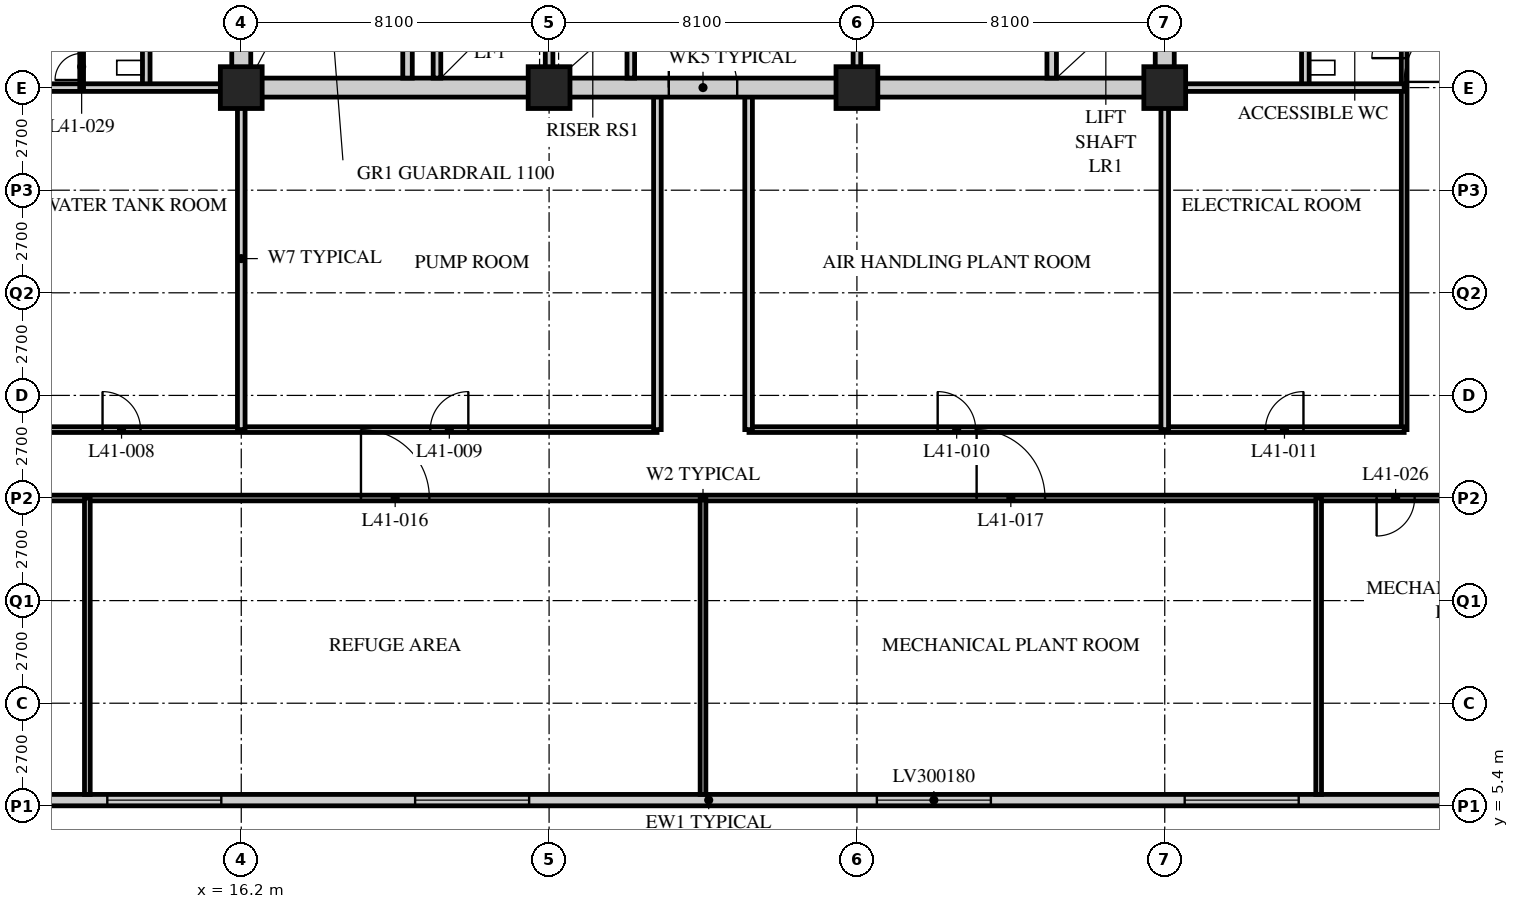
"""IFC4 building model, lengths in metres.
Left out: names, types, materials, properties, quantities, classifications, styles, units other than length and angle.
Written with IfcOpenShell. Run it as: python <this file> out.ifc"""

import sys

from ifc_helpers import new_model, si_unit, direction, frame, frame_2d, origin, origin_2d, place, context, subcontext, project, spatial, rectangle, hollow_rectangle, extrude, element, fill, save


model = new_model("IFC4")
c1 = context("Model", 3, precision=1e-05, world=origin(), true_north=direction((0.0, 1.0)))
c2 = subcontext(c1, "Body", "Model", "MODEL_VIEW")
j1 = project(units=[si_unit("LENGTHUNIT", "METRE"), si_unit("PLANEANGLEUNIT", "RADIAN")], contexts=[c1])
p1 = place(None, origin())
s1 = spatial("IfcSite", under=j1, at=p1, CompositionType="ELEMENT")
p2 = place(p1, origin())
s2 = spatial("IfcBuilding", under=s1, at=p2, CompositionType="ELEMENT")
p3 = place(p2, frame((0.0, 0.0, 157.8)))
s3 = spatial("IfcBuildingStorey", under=s2, at=p3, CompositionType="ELEMENT", Elevation=157.8)
for number, where, z_axis, x_axis in (
    (1, (16.2, 24.3, 0.0), (0.0, 0.0, 1.0), (1.0, 0.0, 0.0)),
    (2, (24.3, 24.3, 0.0), (0.0, 0.0, 1.0), (1.0, 0.0, 0.0)),
    (3, (32.4, 24.3, 0.0), (0.0, 0.0, 1.0), (1.0, 0.0, 0.0)),
    (4, (40.5, 24.3, 0.0), (0.0, 0.0, 1.0), (1.0, 0.0, 0.0)),
):
    element("IfcColumn", number, at=place(p3, frame(where, z_axis=z_axis, x_axis=x_axis)), inside=s3, PredefinedType="COLUMN", context=c2, shape_type="SweptSolid", body=[
        extrude(hollow_rectangle(XDim=1.1, YDim=1.1, WallThickness=0.1, at=origin_2d()), origin(), (0.0, 0.0, 1.0), 7.2),
    ])
p4 = place(p3, frame((8.4, 5.55, 0.0), z_axis=(0.0, 0.0, 1.0), x_axis=(1.0, 0.0, 0.0)))
e5 = element("IfcWall", 5, at=p4, inside=s3, PredefinedType="SOLIDWALL", context=c2, shape_type="SweptSolid", body=[
    extrude(rectangle(XDim=40.2, YDim=0.3, at=frame_2d((20.1, 0.0))), origin(), (0.0, 0.0, 1.0), 5.95),
])
p5 = place(p4, frame((4.275, 0.0, 1.0)))
e6 = element("IfcOpeningElement", 6, at=p5, cuts=e5, PredefinedType="OPENING", context=c2, shape_type="SweptSolid", body=[
    extrude(rectangle(XDim=3.0, YDim=1.8, at=frame_2d((1.5, 0.9))), frame((0.0, 0.16, 0.0), z_axis=(0.0, -1.0, 0.0), x_axis=(1.0, 0.0, 0.0)), (0.0, 0.0, 1.0), 0.32),
])
p6 = place(p4, frame((12.375, 0.0, 1.0)))
e7 = element("IfcOpeningElement", 7, at=p6, cuts=e5, PredefinedType="OPENING", context=c2, shape_type="SweptSolid", body=[
    extrude(rectangle(XDim=3.0, YDim=1.8, at=frame_2d((1.5, 0.9))), frame((0.0, 0.16, 0.0), z_axis=(0.0, -1.0, 0.0), x_axis=(1.0, 0.0, 0.0)), (0.0, 0.0, 1.0), 0.32),
])
p7 = place(p4, frame((24.525, 0.0, 1.0)))
e8 = element("IfcOpeningElement", 8, at=p7, cuts=e5, PredefinedType="OPENING", context=c2, shape_type="SweptSolid", body=[
    extrude(rectangle(XDim=3.0, YDim=1.8, at=frame_2d((1.5, 0.9))), frame((0.0, 0.16, 0.0), z_axis=(0.0, -1.0, 0.0), x_axis=(1.0, 0.0, 0.0)), (0.0, 0.0, 1.0), 0.32),
])
p8 = place(p4, frame((32.625, 0.0, 1.0)))
e9 = element("IfcOpeningElement", 9, at=p8, cuts=e5, PredefinedType="OPENING", context=c2, shape_type="SweptSolid", body=[
    extrude(rectangle(XDim=3.0, YDim=1.8, at=frame_2d((1.5, 0.9))), frame((0.0, 0.16, 0.0), z_axis=(0.0, -1.0, 0.0), x_axis=(1.0, 0.0, 0.0)), (0.0, 0.0, 1.0), 0.32),
])
p9 = place(p3, frame((8.1, 13.5, 0.0), z_axis=(0.0, 0.0, 1.0), x_axis=(1.0, 0.0, 0.0)))
e10 = element("IfcWall", 10, at=p9, inside=s3, PredefinedType="PARTITIONING", context=c2, shape_type="SweptSolid", body=[
    extrude(rectangle(XDim=40.5, YDim=0.15, at=frame_2d((20.25, 0.0))), origin(), (0.0, 0.0, 1.0), 6.95),
])
p10 = place(p9, frame((11.25, 0.0, 0.0)))
e11 = element("IfcOpeningElement", 11, at=p10, cuts=e10, PredefinedType="OPENING", context=c2, shape_type="SweptSolid", body=[
    extrude(rectangle(XDim=1.8, YDim=2.4, at=frame_2d((0.9, 1.2))), frame((0.0, 0.085, 0.0), z_axis=(0.0, -1.0, 0.0), x_axis=(1.0, 0.0, 0.0)), (0.0, 0.0, 1.0), 0.17),
])
p11 = place(p9, frame((27.45, 0.0, 0.0)))
e12 = element("IfcOpeningElement", 12, at=p11, cuts=e10, PredefinedType="OPENING", context=c2, shape_type="SweptSolid", body=[
    extrude(rectangle(XDim=1.8, YDim=2.4, at=frame_2d((0.9, 1.2))), frame((0.0, 0.085, 0.0), z_axis=(0.0, -1.0, 0.0), x_axis=(1.0, 0.0, 0.0)), (0.0, 0.0, 1.0), 0.17),
])
p12 = place(p9, frame((1.525, 0.0, 0.0)))
e13 = element("IfcOpeningElement", 13, at=p12, cuts=e10, PredefinedType="OPENING", context=c2, shape_type="SweptSolid", body=[
    extrude(rectangle(XDim=1.0, YDim=2.1, at=frame_2d((0.5, 1.05))), frame((0.0, 0.085, 0.0), z_axis=(0.0, -1.0, 0.0), x_axis=(1.0, 0.0, 0.0)), (0.0, 0.0, 1.0), 0.17),
])
p13 = place(p9, frame((37.975, 0.0, 0.0)))
e14 = element("IfcOpeningElement", 14, at=p13, cuts=e10, PredefinedType="OPENING", context=c2, shape_type="SweptSolid", body=[
    extrude(rectangle(XDim=1.0, YDim=2.1, at=frame_2d((0.5, 1.05))), frame((0.0, 0.085, 0.0), z_axis=(0.0, -1.0, 0.0), x_axis=(1.0, 0.0, 0.0)), (0.0, 0.0, 1.0), 0.17),
])
p14 = place(p3, frame((46.8, 15.3, 0.0), z_axis=(0.0, 0.0, 1.0), x_axis=(0.0, 1.0, 0.0)))
e15 = element("IfcWall", 15, at=p14, inside=s3, PredefinedType="PARTITIONING", context=c2, shape_type="SweptSolid", body=[
    extrude(rectangle(XDim=28.8, YDim=0.15, at=frame_2d((14.4, 0.0))), origin(), (0.0, 0.0, 1.0), 6.95),
])
p15 = place(p14, frame((9.775, 0.0, 0.0)))
e16 = element("IfcOpeningElement", 16, at=p15, cuts=e15, PredefinedType="OPENING", context=c2, shape_type="SweptSolid", body=[
    extrude(rectangle(XDim=0.85, YDim=2.1, at=frame_2d((0.425, 1.05))), frame((0.0, 0.085, 0.0), z_axis=(0.0, -1.0, 0.0), x_axis=(1.0, 0.0, 0.0)), (0.0, 0.0, 1.0), 0.17),
])
p16 = place(p14, frame((13.75, 0.0, 0.0)))
e17 = element("IfcOpeningElement", 17, at=p16, cuts=e15, PredefinedType="OPENING", context=c2, shape_type="SweptSolid", body=[
    extrude(rectangle(XDim=1.0, YDim=2.1, at=frame_2d((0.5, 1.05))), frame((0.0, 0.085, 0.0), z_axis=(0.0, -1.0, 0.0), x_axis=(1.0, 0.0, 0.0)), (0.0, 0.0, 1.0), 0.17),
])
p17 = place(p14, frame((20.65, 0.0, 0.0)))
e18 = element("IfcOpeningElement", 18, at=p17, cuts=e15, PredefinedType="OPENING", context=c2, shape_type="SweptSolid", body=[
    extrude(rectangle(XDim=1.0, YDim=2.1, at=frame_2d((0.5, 1.05))), frame((0.0, 0.085, 0.0), z_axis=(0.0, -1.0, 0.0), x_axis=(1.0, 0.0, 0.0)), (0.0, 0.0, 1.0), 0.17),
])
p18 = place(p3, frame((9.9, 15.3, 0.0), z_axis=(0.0, 0.0, 1.0), x_axis=(1.0, 0.0, 0.0)))
e19 = element("IfcWall", 19, at=p18, inside=s3, PredefinedType="PARTITIONING", context=c2, shape_type="SweptSolid", body=[
    extrude(rectangle(XDim=17.24, YDim=0.15, at=frame_2d((8.62, 0.0))), origin(), (0.0, 0.0, 1.0), 6.95),
])
p19 = place(p18, frame((2.65, 0.0, 0.0)))
e20 = element("IfcOpeningElement", 20, at=p19, cuts=e19, PredefinedType="OPENING", context=c2, shape_type="SweptSolid", body=[
    extrude(rectangle(XDim=1.0, YDim=2.1, at=frame_2d((0.5, 1.05))), frame((0.0, 0.085, 0.0), z_axis=(0.0, -1.0, 0.0), x_axis=(1.0, 0.0, 0.0)), (0.0, 0.0, 1.0), 0.17),
])
p20 = place(p18, frame((11.275, 0.0, 0.0)))
e21 = element("IfcOpeningElement", 21, at=p20, cuts=e19, PredefinedType="OPENING", context=c2, shape_type="SweptSolid", body=[
    extrude(rectangle(XDim=1.0, YDim=2.1, at=frame_2d((0.5, 1.05))), frame((0.0, 0.085, 0.0), z_axis=(0.0, -1.0, 0.0), x_axis=(1.0, 0.0, 0.0)), (0.0, 0.0, 1.0), 0.17),
])
p21 = place(p3, frame((29.56, 15.3, 0.0), z_axis=(0.0, 0.0, 1.0), x_axis=(1.0, 0.0, 0.0)))
e22 = element("IfcWall", 22, at=p21, inside=s3, PredefinedType="PARTITIONING", context=c2, shape_type="SweptSolid", body=[
    extrude(rectangle(XDim=17.24, YDim=0.15, at=frame_2d((8.62, 0.0))), origin(), (0.0, 0.0, 1.0), 6.95),
])
p22 = place(p21, frame((4.965, 0.0, 0.0)))
e23 = element("IfcOpeningElement", 23, at=p22, cuts=e22, PredefinedType="OPENING", context=c2, shape_type="SweptSolid", body=[
    extrude(rectangle(XDim=1.0, YDim=2.1, at=frame_2d((0.5, 1.05))), frame((0.0, 0.085, 0.0), z_axis=(0.0, -1.0, 0.0), x_axis=(1.0, 0.0, 0.0)), (0.0, 0.0, 1.0), 0.17),
])
p23 = place(p21, frame((13.59, 0.0, 0.0)))
e24 = element("IfcOpeningElement", 24, at=p23, cuts=e22, PredefinedType="OPENING", context=c2, shape_type="SweptSolid", body=[
    extrude(rectangle(XDim=1.0, YDim=2.1, at=frame_2d((0.5, 1.05))), frame((0.0, 0.085, 0.0), z_axis=(0.0, -1.0, 0.0), x_axis=(1.0, 0.0, 0.0)), (0.0, 0.0, 1.0), 0.17),
])
p24 = place(p3, frame((13.7, 24.3, 0.0), z_axis=(0.0, 0.0, 1.0), x_axis=(0.0, 1.0, 0.0)))
e25 = element("IfcWall", 25, at=p24, inside=s3, PredefinedType="SOLIDWALL", context=c2, shape_type="SweptSolid", body=[
    extrude(rectangle(XDim=3.6, YDim=0.2, at=frame_2d((1.8, 0.0))), origin(), (0.0, 0.0, 1.0), 6.95),
])
p25 = place(p3, frame((44.2, 24.3, 0.0), z_axis=(0.0, 0.0, 1.0), x_axis=(0.0, 1.0, 0.0)))
e26 = element("IfcWall", 26, at=p25, inside=s3, PredefinedType="SOLIDWALL", context=c2, shape_type="SweptSolid", body=[
    extrude(rectangle(XDim=2.4, YDim=0.2, at=frame_2d((1.2, 0.0))), origin(), (0.0, 0.0, 1.0), 6.95),
])
for number, where, z_axis, x_axis in (
    (27, (16.2, 15.3, 0.0), (0.0, 0.0, 1.0), (0.0, 1.0, 0.0)),
    (28, (40.5, 15.3, 0.0), (0.0, 0.0, 1.0), (0.0, 1.0, 0.0)),
):
    element("IfcWall", number, at=place(p3, frame(where, z_axis=z_axis, x_axis=x_axis)), inside=s3, PredefinedType="SOLIDWALL", context=c2, shape_type="SweptSolid", body=[
        extrude(rectangle(XDim=9.0, YDim=0.2, at=frame_2d((4.5, 0.0))), origin(), (0.0, 0.0, 1.0), 5.95),
    ])
for number, where, z_axis, x_axis in (
    (29, (27.15, 15.3, 0.0), (0.0, 0.0, 1.0), (0.0, 1.0, 0.0)),
    (30, (29.55, 15.3, 0.0), (0.0, 0.0, 1.0), (0.0, 1.0, 0.0)),
):
    element("IfcWall", number, at=place(p3, frame(where, z_axis=z_axis, x_axis=x_axis)), inside=s3, PredefinedType="SOLIDWALL", context=c2, shape_type="SweptSolid", body=[
        extrude(rectangle(XDim=9.0, YDim=0.2, at=frame_2d((4.5, 0.0))), origin(), (0.0, 0.0, 1.0), 6.95),
    ])
for number, where, z_axis, x_axis in (
    (31, (9.9, 24.3, 0.0), (0.0, 0.0, 1.0), (1.0, 0.0, 0.0)),
    (32, (40.5, 24.3, 0.0), (0.0, 0.0, 1.0), (1.0, 0.0, 0.0)),
):
    element("IfcWall", number, at=place(p3, frame(where, z_axis=z_axis, x_axis=x_axis)), inside=s3, PredefinedType="SOLIDWALL", context=c2, shape_type="SweptSolid", body=[
        extrude(rectangle(XDim=6.3, YDim=0.2, at=frame_2d((3.15, 0.0))), origin(), (0.0, 0.0, 1.0), 6.95),
    ])
for number, where, z_axis, x_axis in (
    (33, (28.35, 13.5, 0.0), (0.0, 0.0, 1.0), (0.0, -1.0, 0.0)),
    (34, (12.15, 13.5, 0.0), (0.0, 0.0, 1.0), (0.0, -1.0, 0.0)),
    (35, (44.55, 13.5, 0.0), (0.0, 0.0, 1.0), (0.0, -1.0, 0.0)),
):
    element("IfcWall", number, at=place(p3, frame(where, z_axis=z_axis, x_axis=x_axis)), inside=s3, PredefinedType="PARTITIONING", context=c2, shape_type="SweptSolid", body=[
        extrude(rectangle(XDim=7.8, YDim=0.15, at=frame_2d((3.9, 0.0))), origin(), (0.0, 0.0, 1.0), 6.95),
    ])
p26 = place(p3, frame((12.0, 24.3, 0.0), z_axis=(0.0, 0.0, 1.0), x_axis=(0.0, 1.0, 0.0)))
e36 = element("IfcWall", 36, at=p26, inside=s3, PredefinedType="PARTITIONING", context=c2, shape_type="SweptSolid", body=[
    extrude(rectangle(XDim=1.05, YDim=0.1, at=frame_2d((0.525, 0.0))), origin(), (0.0, 0.0, 1.0), 6.95),
])
p27 = place(p26, frame((0.2, 0.0, 0.0)))
e37 = element("IfcOpeningElement", 37, at=p27, cuts=e36, PredefinedType="OPENING", context=c2, shape_type="SweptSolid", body=[
    extrude(rectangle(XDim=0.7, YDim=2.0, at=frame_2d((0.35, 1.0))), frame((0.0, 0.06, 0.0), z_axis=(0.0, -1.0, 0.0), x_axis=(1.0, 0.0, 0.0)), (0.0, 0.0, 1.0), 0.12),
])
p28 = place(p3, frame((15.95, 24.3, 0.0), z_axis=(0.0, 0.0, 1.0), x_axis=(1.0, 0.0, 0.0)))
e38 = element("IfcWall", 38, at=p28, inside=s3, PredefinedType="SOLIDWALL", context=c2, shape_type="SweptSolid", body=[
    extrude(rectangle(XDim=24.8, YDim=0.5, at=frame_2d((12.4, 0.0))), origin(), (0.0, 0.0, 1.0), 6.18),
])
p29 = place(p28, frame((11.5, 0.0, 0.0)))
e39 = element("IfcOpeningElement", 39, at=p29, cuts=e38, PredefinedType="OPENING", context=c2, shape_type="SweptSolid", body=[
    extrude(rectangle(XDim=1.8, YDim=2.4, at=frame_2d((0.9, 1.2))), frame((0.0, 0.26, 0.0), z_axis=(0.0, -1.0, 0.0), x_axis=(1.0, 0.0, 0.0)), (0.0, 0.0, 1.0), 0.52),
])
for number, where, z_axis, x_axis in (
    (40, (16.2, 24.55, 0.0), (0.0, 0.0, 1.0), (0.0, 1.0, 0.0)),
    (41, (40.5, 24.55, 0.0), (0.0, 0.0, 1.0), (0.0, 1.0, 0.0)),
):
    element("IfcWall", number, at=place(p3, frame(where, z_axis=z_axis, x_axis=x_axis)), inside=s3, PredefinedType="SOLIDWALL", context=c2, shape_type="SweptSolid", body=[
        extrude(rectangle(XDim=15.7, YDim=0.5, at=frame_2d((7.85, 0.0))), origin(), (0.0, 0.0, 1.0), 5.95),
    ])
p30 = place(p3, frame((24.3, 24.55, 0.0), z_axis=(0.0, 0.0, 1.0), x_axis=(0.0, 1.0, 0.0)))
e42 = element("IfcWall", 42, at=p30, inside=s3, PredefinedType="SOLIDWALL", context=c2, shape_type="SweptSolid", body=[
    extrude(rectangle(XDim=7.75, YDim=0.2, at=frame_2d((3.875, 0.0))), origin(), (0.0, 0.0, 1.0), 6.25),
])
p31 = place(p30, frame((4.6, 0.0, 0.0)))
e43 = element("IfcOpeningElement", 43, at=p31, cuts=e42, PredefinedType="OPENING", context=c2, shape_type="SweptSolid", body=[
    extrude(rectangle(XDim=1.2, YDim=2.1, at=frame_2d((0.6, 1.05))), frame((0.0, 0.11, 0.0), z_axis=(0.0, -1.0, 0.0), x_axis=(1.0, 0.0, 0.0)), (0.0, 0.0, 1.0), 0.22),
])
p32 = place(p3, frame((20.575, 24.55, 0.0), z_axis=(0.0, 0.0, 1.0), x_axis=(0.0, 1.0, 0.0)))
e44 = element("IfcWall", 44, at=p32, inside=s3, PredefinedType="SOLIDWALL", context=c2, shape_type="SweptSolid", body=[
    extrude(rectangle(XDim=7.75, YDim=0.25, at=frame_2d((3.875, 0.0))), origin(), (0.0, 0.0, 1.0), 6.95),
])
p33 = place(p32, frame((6.2, 0.0, 0.0)))
e45 = element("IfcOpeningElement", 45, at=p33, cuts=e44, PredefinedType="OPENING", context=c2, shape_type="SweptSolid", body=[
    extrude(rectangle(XDim=1.2, YDim=2.1, at=frame_2d((0.6, 1.05))), frame((0.0, 0.135, 0.0), z_axis=(0.0, -1.0, 0.0), x_axis=(1.0, 0.0, 0.0)), (0.0, 0.0, 1.0), 0.27),
])
p34 = place(p3, frame((21.35, 24.55, 0.0), z_axis=(0.0, 0.0, 1.0), x_axis=(0.0, 1.0, 0.0)))
e46 = element("IfcWall", 46, at=p34, inside=s3, PredefinedType="SOLIDWALL", context=c2, shape_type="SweptSolid", body=[
    extrude(rectangle(XDim=2.6, YDim=0.2, at=frame_2d((1.3, 0.0))), origin(), (0.0, 0.0, 1.0), 6.95),
])
p35 = place(p3, frame((26.45, 24.55, 0.0), z_axis=(0.0, 0.0, 1.0), x_axis=(0.0, 1.0, 0.0)))
e47 = element("IfcWall", 47, at=p35, inside=s3, PredefinedType="SOLIDWALL", context=c2, shape_type="SweptSolid", body=[
    extrude(rectangle(XDim=1.6, YDim=0.2, at=frame_2d((0.8, 0.0))), origin(), (0.0, 0.0, 1.0), 6.95),
])
p36 = place(p3, frame((37.525, 24.55, 0.0), z_axis=(0.0, 0.0, 1.0), x_axis=(0.0, 1.0, 0.0)))
e48 = element("IfcWall", 48, at=p36, inside=s3, PredefinedType="SOLIDWALL", context=c2, shape_type="SweptSolid", body=[
    extrude(rectangle(XDim=7.75, YDim=0.25, at=frame_2d((3.875, 0.0))), origin(), (0.0, 0.0, 1.0), 6.95),
])
p37 = place(p3, frame((32.4, 24.55, 0.0), z_axis=(0.0, 0.0, 1.0), x_axis=(0.0, 1.0, 0.0)))
e49 = element("IfcWall", 49, at=p37, inside=s3, PredefinedType="PARTITIONING", context=c2, shape_type="SweptSolid", body=[
    extrude(rectangle(XDim=7.75, YDim=0.2, at=frame_2d((3.875, 0.0))), origin(), (0.0, 0.0, 1.0), 6.25),
])
p38 = place(p37, frame((1.35, 0.0, 0.0)))
e50 = element("IfcOpeningElement", 50, at=p38, cuts=e49, PredefinedType="OPENING", context=c2, shape_type="SweptSolid", body=[
    extrude(rectangle(XDim=0.9, YDim=2.1, at=frame_2d((0.45, 1.05))), frame((0.0, 0.11, 0.0), z_axis=(0.0, -1.0, 0.0), x_axis=(1.0, 0.0, 0.0)), (0.0, 0.0, 1.0), 0.22),
])
p39 = place(p37, frame((5.3, 0.0, 0.0)))
e51 = element("IfcOpeningElement", 51, at=p39, cuts=e49, PredefinedType="OPENING", context=c2, shape_type="SweptSolid", body=[
    extrude(rectangle(XDim=0.9, YDim=2.1, at=frame_2d((0.45, 1.05))), frame((0.0, 0.11, 0.0), z_axis=(0.0, -1.0, 0.0), x_axis=(1.0, 0.0, 0.0)), (0.0, 0.0, 1.0), 0.22),
])
p40 = place(p5, origin())
e52 = element("IfcWindow", 52, at=p40, inside=s3, PartitioningType="SINGLE_PANEL", PredefinedType="USERDEFINED", context=c2, shape_type="SweptSolid", body=[
    extrude(rectangle(XDim=3.0, YDim=1.8, at=frame_2d((1.5, 0.9))), frame((0.0, 0.075, 0.0), z_axis=(0.0, -1.0, 0.0), x_axis=(1.0, 0.0, 0.0)), (0.0, 0.0, 1.0), 0.15),
])
fill(e6, e52)
p41 = place(p6, origin())
e53 = element("IfcWindow", 53, at=p41, inside=s3, PartitioningType="SINGLE_PANEL", PredefinedType="USERDEFINED", context=c2, shape_type="SweptSolid", body=[
    extrude(rectangle(XDim=3.0, YDim=1.8, at=frame_2d((1.5, 0.9))), frame((0.0, 0.075, 0.0), z_axis=(0.0, -1.0, 0.0), x_axis=(1.0, 0.0, 0.0)), (0.0, 0.0, 1.0), 0.15),
])
fill(e7, e53)
p42 = place(p7, origin())
e54 = element("IfcWindow", 54, at=p42, inside=s3, PartitioningType="SINGLE_PANEL", PredefinedType="USERDEFINED", context=c2, shape_type="SweptSolid", body=[
    extrude(rectangle(XDim=3.0, YDim=1.8, at=frame_2d((1.5, 0.9))), frame((0.0, 0.075, 0.0), z_axis=(0.0, -1.0, 0.0), x_axis=(1.0, 0.0, 0.0)), (0.0, 0.0, 1.0), 0.15),
])
fill(e8, e54)
p43 = place(p8, origin())
e55 = element("IfcWindow", 55, at=p43, inside=s3, PartitioningType="SINGLE_PANEL", PredefinedType="USERDEFINED", context=c2, shape_type="SweptSolid", body=[
    extrude(rectangle(XDim=3.0, YDim=1.8, at=frame_2d((1.5, 0.9))), frame((0.0, 0.075, 0.0), z_axis=(0.0, -1.0, 0.0), x_axis=(1.0, 0.0, 0.0)), (0.0, 0.0, 1.0), 0.15),
])
fill(e9, e55)
p44 = place(p15, origin())
e56 = element("IfcDoor", 56, at=p44, inside=s3, OperationType="SINGLE_SWING_LEFT", PredefinedType="DOOR", context=c2, shape_type="SweptSolid", body=[
    extrude(rectangle(XDim=0.85, YDim=2.1, at=frame_2d((0.425, 1.05))), frame((0.0, 0.025, 0.0), z_axis=(0.0, -1.0, 0.0), x_axis=(1.0, 0.0, 0.0)), (0.0, 0.0, 1.0), 0.05),
])
fill(e16, e56)
p45 = place(p19, origin())
e57 = element("IfcDoor", 57, at=p45, inside=s3, OperationType="SINGLE_SWING_LEFT", PredefinedType="DOOR", context=c2, shape_type="SweptSolid", body=[
    extrude(rectangle(XDim=1.0, YDim=2.1, at=frame_2d((0.5, 1.05))), frame((0.0, 0.025, 0.0), z_axis=(0.0, -1.0, 0.0), x_axis=(1.0, 0.0, 0.0)), (0.0, 0.0, 1.0), 0.05),
])
fill(e20, e57)
p46 = place(p20, origin())
e58 = element("IfcDoor", 58, at=p46, inside=s3, OperationType="SINGLE_SWING_RIGHT", PredefinedType="DOOR", context=c2, shape_type="SweptSolid", body=[
    extrude(rectangle(XDim=1.0, YDim=2.1, at=frame_2d((0.5, 1.05))), frame((0.0, 0.025, 0.0), z_axis=(0.0, -1.0, 0.0), x_axis=(1.0, 0.0, 0.0)), (0.0, 0.0, 1.0), 0.05),
])
fill(e21, e58)
p47 = place(p22, origin())
e59 = element("IfcDoor", 59, at=p47, inside=s3, OperationType="SINGLE_SWING_LEFT", PredefinedType="DOOR", context=c2, shape_type="SweptSolid", body=[
    extrude(rectangle(XDim=1.0, YDim=2.1, at=frame_2d((0.5, 1.05))), frame((0.0, 0.025, 0.0), z_axis=(0.0, -1.0, 0.0), x_axis=(1.0, 0.0, 0.0)), (0.0, 0.0, 1.0), 0.05),
])
fill(e23, e59)
p48 = place(p23, origin())
e60 = element("IfcDoor", 60, at=p48, inside=s3, OperationType="SINGLE_SWING_RIGHT", PredefinedType="DOOR", context=c2, shape_type="SweptSolid", body=[
    extrude(rectangle(XDim=1.0, YDim=2.1, at=frame_2d((0.5, 1.05))), frame((0.0, 0.025, 0.0), z_axis=(0.0, -1.0, 0.0), x_axis=(1.0, 0.0, 0.0)), (0.0, 0.0, 1.0), 0.05),
])
fill(e24, e60)
p49 = place(p10, origin())
e61 = element("IfcDoor", 61, at=p49, inside=s3, OperationType="DOUBLE_DOOR_SINGLE_SWING", PredefinedType="DOOR", context=c2, shape_type="SweptSolid", body=[
    extrude(rectangle(XDim=1.8, YDim=2.4, at=frame_2d((0.9, 1.2))), frame((0.0, 0.025, 0.0), z_axis=(0.0, -1.0, 0.0), x_axis=(1.0, 0.0, 0.0)), (0.0, 0.0, 1.0), 0.05),
])
fill(e11, e61)
p50 = place(p11, origin())
e62 = element("IfcDoor", 62, at=p50, inside=s3, OperationType="DOUBLE_DOOR_SINGLE_SWING", PredefinedType="DOOR", context=c2, shape_type="SweptSolid", body=[
    extrude(rectangle(XDim=1.8, YDim=2.4, at=frame_2d((0.9, 1.2))), frame((0.0, 0.025, 0.0), z_axis=(0.0, -1.0, 0.0), x_axis=(1.0, 0.0, 0.0)), (0.0, 0.0, 1.0), 0.05),
])
fill(e12, e62)
p51 = place(p13, origin())
e63 = element("IfcDoor", 63, at=p51, inside=s3, OperationType="SINGLE_SWING_RIGHT", PredefinedType="DOOR", context=c2, shape_type="SweptSolid", body=[
    extrude(rectangle(XDim=1.0, YDim=2.1, at=frame_2d((0.5, 1.05))), frame((0.0, 0.025, 0.0), z_axis=(0.0, -1.0, 0.0), x_axis=(1.0, 0.0, 0.0)), (0.0, 0.0, 1.0), 0.05),
])
fill(e14, e63)
p52 = place(p27, origin())
e64 = element("IfcDoor", 64, at=p52, inside=s3, OperationType="SINGLE_SWING_LEFT", PredefinedType="DOOR", context=c2, shape_type="SweptSolid", body=[
    extrude(rectangle(XDim=0.7, YDim=2.0, at=frame_2d((0.35, 1.0))), frame((0.0, 0.025, 0.0), z_axis=(0.0, -1.0, 0.0), x_axis=(1.0, 0.0, 0.0)), (0.0, 0.0, 1.0), 0.05),
])
fill(e37, e64)
p53 = place(p29, origin())
e65 = element("IfcDoor", 65, at=p53, inside=s3, OperationType="DOUBLE_DOOR_SINGLE_SWING", PredefinedType="DOOR", context=c2, shape_type="SweptSolid", body=[
    extrude(rectangle(XDim=1.8, YDim=2.4, at=frame_2d((0.9, 1.2))), frame((0.0, 0.025, 0.0), z_axis=(0.0, -1.0, 0.0), x_axis=(1.0, 0.0, 0.0)), (0.0, 0.0, 1.0), 0.05),
])
fill(e39, e65)
save(model, sys.argv[1])
